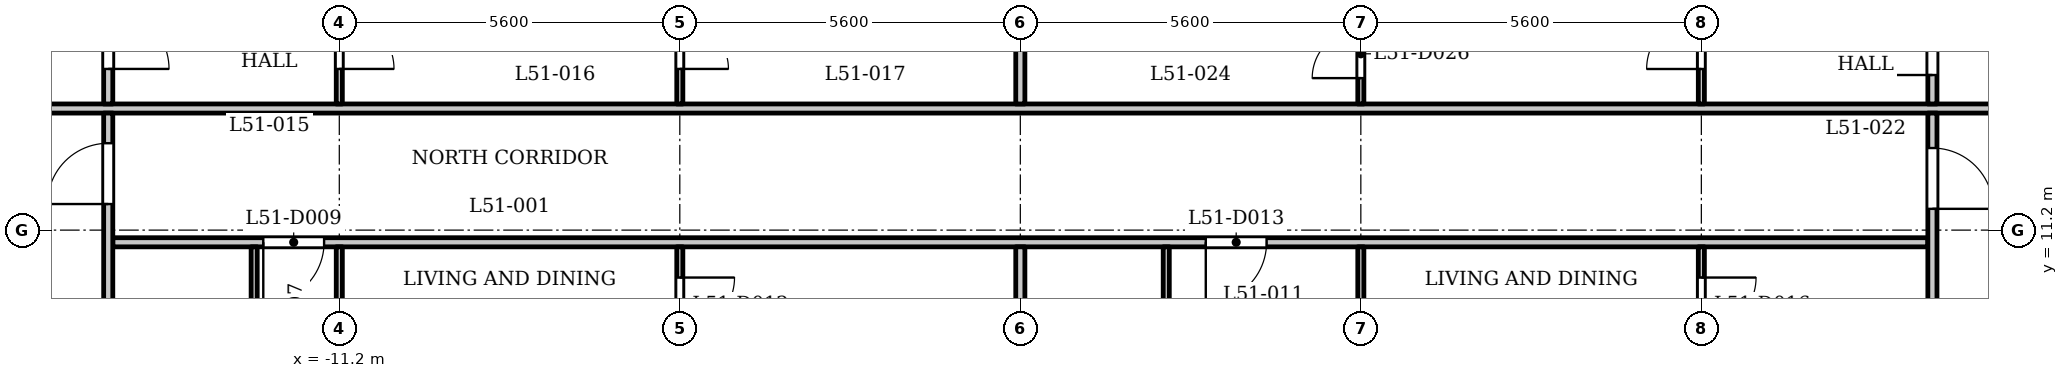
"""IFC4 building model, lengths in metres.
Left out: names, types, materials, properties, quantities, classifications, styles, units other than length and angle.
Written with IfcOpenShell. Run it as: python <this file> out.ifc"""

import sys

from ifc_helpers import new_model, si_unit, direction, frame, frame_2d, origin, place, context, subcontext, project, spatial, rectangle, extrude, element, fill, save


model = new_model("IFC4")
c1 = context("Model", 3, precision=1e-05, world=origin(), true_north=direction((0.0, 1.0)))
c2 = subcontext(c1, "Body", "Model", "MODEL_VIEW")
j1 = project(units=[si_unit("LENGTHUNIT", "METRE"), si_unit("PLANEANGLEUNIT", "RADIAN")], contexts=[c1])
p1 = place(None, origin())
s1 = spatial("IfcSite", under=j1, at=p1, CompositionType="ELEMENT")
p2 = place(p1, origin())
s2 = spatial("IfcBuilding", under=s1, at=p2, CompositionType="ELEMENT")
p3 = place(p2, frame((0.0, 0.0, 199.4)))
s3 = spatial("IfcBuildingStorey", under=s2, at=p3, CompositionType="ELEMENT", Elevation=199.4)
p4 = place(p3, frame((-14.925, 11.0, 0.0), z_axis=(0.0, 0.0, 1.0), x_axis=(1.0, 0.0, 0.0)))
e1 = element("IfcWall", 1, at=p4, inside=s3, PredefinedType="PARTITIONING", context=c2, shape_type="SweptSolid", body=[
    extrude(rectangle(XDim=29.85, YDim=0.15, at=frame_2d((14.925, 0.0))), origin(), (0.0, 0.0, 1.0), 3.2),
])
p5 = place(p4, frame((2.475, 0.0, 0.0)))
e2 = element("IfcOpeningElement", 2, at=p5, cuts=e1, PredefinedType="OPENING", context=c2, shape_type="SweptSolid", body=[
    extrude(rectangle(XDim=1.0, YDim=2.1, at=frame_2d((0.5, 1.05))), frame((0.0, 0.085, 0.0), z_axis=(0.0, -1.0, 0.0), x_axis=(1.0, 0.0, 0.0)), (0.0, 0.0, 1.0), 0.17),
])
p6 = place(p4, frame((17.975, 0.0, 0.0)))
e3 = element("IfcOpeningElement", 3, at=p6, cuts=e1, PredefinedType="OPENING", context=c2, shape_type="SweptSolid", body=[
    extrude(rectangle(XDim=1.0, YDim=2.1, at=frame_2d((0.5, 1.05))), frame((0.0, 0.085, 0.0), z_axis=(0.0, -1.0, 0.0), x_axis=(1.0, 0.0, 0.0)), (0.0, 0.0, 1.0), 0.17),
])
p7 = place(p3, frame((-17.4, 13.2, 0.0), z_axis=(0.0, 0.0, 1.0), x_axis=(1.0, 0.0, 0.0)))
e4 = element("IfcWall", 4, at=p7, inside=s3, PredefinedType="PARTITIONING", context=c2, shape_type="SweptSolid", body=[
    extrude(rectangle(XDim=34.8, YDim=0.15, at=frame_2d((17.4, 0.0))), origin(), (0.0, 0.0, 1.0), 3.2),
])
p8 = place(p7, frame((0.25, 0.0, 0.0)))
e5 = element("IfcOpeningElement", 5, at=p8, cuts=e4, PredefinedType="OPENING", context=c2, shape_type="SweptSolid", body=[
    extrude(rectangle(XDim=1.0, YDim=2.1, at=frame_2d((0.5, 1.05))), frame((0.0, 0.085, 0.0), z_axis=(0.0, -1.0, 0.0), x_axis=(1.0, 0.0, 0.0)), (0.0, 0.0, 1.0), 0.17),
])
p9 = place(p7, frame((33.65, 0.0, 0.0)))
e6 = element("IfcOpeningElement", 6, at=p9, cuts=e4, PredefinedType="OPENING", context=c2, shape_type="SweptSolid", body=[
    extrude(rectangle(XDim=1.0, YDim=2.1, at=frame_2d((0.5, 1.05))), frame((0.0, 0.085, 0.0), z_axis=(0.0, -1.0, 0.0), x_axis=(1.0, 0.0, 0.0)), (0.0, 0.0, 1.0), 0.17),
])
p10 = place(p3, frame((-15.0, 6.769, 0.0), z_axis=(0.0, 0.0, 1.0), x_axis=(0.0, 1.0, 0.0)))
e7 = element("IfcWall", 7, at=p10, inside=s3, PredefinedType="PARTITIONING", context=c2, shape_type="SweptSolid", body=[
    extrude(rectangle(XDim=6.356, YDim=0.15, at=frame_2d((3.178, 0.0))), origin(), (0.0, 0.0, 1.0), 3.2),
])
p11 = place(p10, frame((4.86, 0.0, 0.0)))
e8 = element("IfcOpeningElement", 8, at=p11, cuts=e7, PredefinedType="OPENING", context=c2, shape_type="SweptSolid", body=[
    extrude(rectangle(XDim=1.0, YDim=2.1, at=frame_2d((0.5, 1.05))), frame((0.0, 0.085, 0.0), z_axis=(0.0, -1.0, 0.0), x_axis=(1.0, 0.0, 0.0)), (0.0, 0.0, 1.0), 0.17),
])
p12 = place(p3, frame((-15.0, 13.275, 0.0), z_axis=(0.0, 0.0, 1.0), x_axis=(0.0, 1.0, 0.0)))
e9 = element("IfcWall", 9, at=p12, inside=s3, PredefinedType="PARTITIONING", context=c2, shape_type="SweptSolid", body=[
    extrude(rectangle(XDim=2.05, YDim=0.15, at=frame_2d((1.025, 0.0))), origin(), (0.0, 0.0, 1.0), 3.2),
])
p13 = place(p12, frame((0.576, 0.0, 0.0)))
e10 = element("IfcOpeningElement", 10, at=p13, cuts=e9, PredefinedType="OPENING", context=c2, shape_type="SweptSolid", body=[
    extrude(rectangle(XDim=1.0, YDim=2.1, at=frame_2d((0.5, 1.05))), frame((0.0, 0.085, 0.0), z_axis=(0.0, -1.0, 0.0), x_axis=(1.0, 0.0, 0.0)), (0.0, 0.0, 1.0), 0.17),
])
p14 = place(p3, frame((-12.6, 7.32, 0.0), z_axis=(0.0, 0.0, 1.0), x_axis=(0.0, 1.0, 0.0)))
e11 = element("IfcWall", 11, at=p14, inside=s3, PredefinedType="PARTITIONING", context=c2, shape_type="SweptSolid", body=[
    extrude(rectangle(XDim=3.605, YDim=0.1, at=frame_2d((1.802, 0.0))), origin(), (0.0, 0.0, 1.0), 3.2),
])
p15 = place(p14, frame((1.729, 0.0, 0.0)))
e12 = element("IfcOpeningElement", 12, at=p15, cuts=e11, PredefinedType="OPENING", context=c2, shape_type="SweptSolid", body=[
    extrude(rectangle(XDim=0.8, YDim=2.1, at=frame_2d((0.4, 1.05))), frame((0.0, 0.06, 0.0), z_axis=(0.0, -1.0, 0.0), x_axis=(1.0, 0.0, 0.0)), (0.0, 0.0, 1.0), 0.12),
])
p16 = place(p3, frame((-11.2, 7.32, 0.0), z_axis=(0.0, 0.0, 1.0), x_axis=(0.0, 1.0, 0.0)))
e13 = element("IfcWall", 13, at=p16, inside=s3, PredefinedType="PARTITIONING", context=c2, shape_type="SweptSolid", body=[
    extrude(rectangle(XDim=3.605, YDim=0.1, at=frame_2d((1.802, 0.0))), origin(), (0.0, 0.0, 1.0), 3.2),
])
p17 = place(p16, frame((1.7, 0.0, 0.0)))
e14 = element("IfcOpeningElement", 14, at=p17, cuts=e13, PredefinedType="OPENING", context=c2, shape_type="SweptSolid", body=[
    extrude(rectangle(XDim=0.9, YDim=2.1, at=frame_2d((0.45, 1.05))), frame((0.0, 0.06, 0.0), z_axis=(0.0, -1.0, 0.0), x_axis=(1.0, 0.0, 0.0)), (0.0, 0.0, 1.0), 0.12),
])
p18 = place(p3, frame((-11.2, 13.275, 0.0), z_axis=(0.0, 0.0, 1.0), x_axis=(0.0, 1.0, 0.0)))
e15 = element("IfcWall", 15, at=p18, inside=s3, PredefinedType="PARTITIONING", context=c2, shape_type="SweptSolid", body=[
    extrude(rectangle(XDim=2.575, YDim=0.1, at=frame_2d((1.288, 0.0))), origin(), (0.0, 0.0, 1.0), 3.2),
])
p19 = place(p18, frame((0.576, 0.0, 0.0)))
e16 = element("IfcOpeningElement", 16, at=p19, cuts=e15, PredefinedType="OPENING", context=c2, shape_type="SweptSolid", body=[
    extrude(rectangle(XDim=0.9, YDim=2.1, at=frame_2d((0.45, 1.05))), frame((0.0, 0.06, 0.0), z_axis=(0.0, -1.0, 0.0), x_axis=(1.0, 0.0, 0.0)), (0.0, 0.0, 1.0), 0.12),
])
p20 = place(p3, frame((-5.6, 7.32, 0.0), z_axis=(0.0, 0.0, 1.0), x_axis=(0.0, 1.0, 0.0)))
e17 = element("IfcWall", 17, at=p20, inside=s3, PredefinedType="PARTITIONING", context=c2, shape_type="SweptSolid", body=[
    extrude(rectangle(XDim=3.605, YDim=0.1, at=frame_2d((1.802, 0.0))), origin(), (0.0, 0.0, 1.0), 3.2),
])
p21 = place(p20, frame((2.2, 0.0, 0.0)))
e18 = element("IfcOpeningElement", 18, at=p21, cuts=e17, PredefinedType="OPENING", context=c2, shape_type="SweptSolid", body=[
    extrude(rectangle(XDim=0.9, YDim=2.1, at=frame_2d((0.45, 1.05))), frame((0.0, 0.06, 0.0), z_axis=(0.0, -1.0, 0.0), x_axis=(1.0, 0.0, 0.0)), (0.0, 0.0, 1.0), 0.12),
])
p22 = place(p3, frame((-5.6, 13.275, 0.0), z_axis=(0.0, 0.0, 1.0), x_axis=(0.0, 1.0, 0.0)))
e19 = element("IfcWall", 19, at=p22, inside=s3, PredefinedType="PARTITIONING", context=c2, shape_type="SweptSolid", body=[
    extrude(rectangle(XDim=2.575, YDim=0.1, at=frame_2d((1.288, 0.0))), origin(), (0.0, 0.0, 1.0), 3.2),
])
p23 = place(p22, frame((0.576, 0.0, 0.0)))
e20 = element("IfcOpeningElement", 20, at=p23, cuts=e19, PredefinedType="OPENING", context=c2, shape_type="SweptSolid", body=[
    extrude(rectangle(XDim=0.8, YDim=2.1, at=frame_2d((0.4, 1.05))), frame((0.0, 0.06, 0.0), z_axis=(0.0, -1.0, 0.0), x_axis=(1.0, 0.0, 0.0)), (0.0, 0.0, 1.0), 0.12),
])
p24 = place(p3, frame((0.0, 7.32, 0.0), z_axis=(0.0, 0.0, 1.0), x_axis=(0.0, 1.0, 0.0)))
e21 = element("IfcWall", 21, at=p24, inside=s3, PredefinedType="PARTITIONING", context=c2, shape_type="SweptSolid", body=[
    extrude(rectangle(XDim=3.605, YDim=0.15, at=frame_2d((1.802, 0.0))), origin(), (0.0, 0.0, 1.0), 3.2),
])
p25 = place(p3, frame((0.0, 13.275, 0.0), z_axis=(0.0, 0.0, 1.0), x_axis=(0.0, 1.0, 0.0)))
e22 = element("IfcWall", 22, at=p25, inside=s3, PredefinedType="PARTITIONING", context=c2, shape_type="SweptSolid", body=[
    extrude(rectangle(XDim=2.575, YDim=0.15, at=frame_2d((1.288, 0.0))), origin(), (0.0, 0.0, 1.0), 3.2),
])
p26 = place(p3, frame((2.4, 7.32, 0.0), z_axis=(0.0, 0.0, 1.0), x_axis=(0.0, 1.0, 0.0)))
e23 = element("IfcWall", 23, at=p26, inside=s3, PredefinedType="PARTITIONING", context=c2, shape_type="SweptSolid", body=[
    extrude(rectangle(XDim=3.605, YDim=0.1, at=frame_2d((1.802, 0.0))), origin(), (0.0, 0.0, 1.0), 3.2),
])
p27 = place(p26, frame((0.479, 0.0, 0.0)))
e24 = element("IfcOpeningElement", 24, at=p27, cuts=e23, PredefinedType="OPENING", context=c2, shape_type="SweptSolid", body=[
    extrude(rectangle(XDim=0.8, YDim=2.1, at=frame_2d((0.4, 1.05))), frame((0.0, 0.06, 0.0), z_axis=(0.0, -1.0, 0.0), x_axis=(1.0, 0.0, 0.0)), (0.0, 0.0, 1.0), 0.12),
])
p28 = place(p3, frame((5.6, 7.32, 0.0), z_axis=(0.0, 0.0, 1.0), x_axis=(0.0, 1.0, 0.0)))
e25 = element("IfcWall", 25, at=p28, inside=s3, PredefinedType="PARTITIONING", context=c2, shape_type="SweptSolid", body=[
    extrude(rectangle(XDim=3.605, YDim=0.1, at=frame_2d((1.802, 0.0))), origin(), (0.0, 0.0, 1.0), 3.2),
])
p29 = place(p28, frame((1.7, 0.0, 0.0)))
e26 = element("IfcOpeningElement", 26, at=p29, cuts=e25, PredefinedType="OPENING", context=c2, shape_type="SweptSolid", body=[
    extrude(rectangle(XDim=0.9, YDim=2.1, at=frame_2d((0.45, 1.05))), frame((0.0, 0.06, 0.0), z_axis=(0.0, -1.0, 0.0), x_axis=(1.0, 0.0, 0.0)), (0.0, 0.0, 1.0), 0.12),
])
p30 = place(p3, frame((5.6, 13.275, 0.0), z_axis=(0.0, 0.0, 1.0), x_axis=(0.0, 1.0, 0.0)))
e27 = element("IfcWall", 27, at=p30, inside=s3, PredefinedType="PARTITIONING", context=c2, shape_type="SweptSolid", body=[
    extrude(rectangle(XDim=2.575, YDim=0.1, at=frame_2d((1.288, 0.0))), origin(), (0.0, 0.0, 1.0), 3.2),
])
p31 = place(p30, frame((0.425, 0.0, 0.0)))
e28 = element("IfcOpeningElement", 28, at=p31, cuts=e27, PredefinedType="OPENING", context=c2, shape_type="SweptSolid", body=[
    extrude(rectangle(XDim=0.8, YDim=2.1, at=frame_2d((0.4, 1.05))), frame((0.0, 0.06, 0.0), z_axis=(0.0, -1.0, 0.0), x_axis=(1.0, 0.0, 0.0)), (0.0, 0.0, 1.0), 0.12),
])
p32 = place(p3, frame((11.2, 7.32, 0.0), z_axis=(0.0, 0.0, 1.0), x_axis=(0.0, 1.0, 0.0)))
e29 = element("IfcWall", 29, at=p32, inside=s3, PredefinedType="PARTITIONING", context=c2, shape_type="SweptSolid", body=[
    extrude(rectangle(XDim=3.605, YDim=0.1, at=frame_2d((1.802, 0.0))), origin(), (0.0, 0.0, 1.0), 3.2),
])
p33 = place(p32, frame((2.2, 0.0, 0.0)))
e30 = element("IfcOpeningElement", 30, at=p33, cuts=e29, PredefinedType="OPENING", context=c2, shape_type="SweptSolid", body=[
    extrude(rectangle(XDim=0.9, YDim=2.1, at=frame_2d((0.45, 1.05))), frame((0.0, 0.06, 0.0), z_axis=(0.0, -1.0, 0.0), x_axis=(1.0, 0.0, 0.0)), (0.0, 0.0, 1.0), 0.12),
])
p34 = place(p3, frame((11.2, 13.275, 0.0), z_axis=(0.0, 0.0, 1.0), x_axis=(0.0, 1.0, 0.0)))
e31 = element("IfcWall", 31, at=p34, inside=s3, PredefinedType="PARTITIONING", context=c2, shape_type="SweptSolid", body=[
    extrude(rectangle(XDim=2.575, YDim=0.1, at=frame_2d((1.288, 0.0))), origin(), (0.0, 0.0, 1.0), 3.2),
])
p35 = place(p34, frame((0.575, 0.0, 0.0)))
e32 = element("IfcOpeningElement", 32, at=p35, cuts=e31, PredefinedType="OPENING", context=c2, shape_type="SweptSolid", body=[
    extrude(rectangle(XDim=0.9, YDim=2.1, at=frame_2d((0.45, 1.05))), frame((0.0, 0.06, 0.0), z_axis=(0.0, -1.0, 0.0), x_axis=(1.0, 0.0, 0.0)), (0.0, 0.0, 1.0), 0.12),
])
p36 = place(p3, frame((15.0, 6.769, 0.0), z_axis=(0.0, 0.0, 1.0), x_axis=(0.0, 1.0, 0.0)))
e33 = element("IfcWall", 33, at=p36, inside=s3, PredefinedType="PARTITIONING", context=c2, shape_type="SweptSolid", body=[
    extrude(rectangle(XDim=6.356, YDim=0.15, at=frame_2d((3.178, 0.0))), origin(), (0.0, 0.0, 1.0), 3.2),
])
p37 = place(p36, frame((4.781, 0.0, 0.0)))
e34 = element("IfcOpeningElement", 34, at=p37, cuts=e33, PredefinedType="OPENING", context=c2, shape_type="SweptSolid", body=[
    extrude(rectangle(XDim=1.0, YDim=2.1, at=frame_2d((0.5, 1.05))), frame((0.0, 0.085, 0.0), z_axis=(0.0, -1.0, 0.0), x_axis=(1.0, 0.0, 0.0)), (0.0, 0.0, 1.0), 0.17),
])
p38 = place(p3, frame((15.0, 13.275, 0.0), z_axis=(0.0, 0.0, 1.0), x_axis=(0.0, 1.0, 0.0)))
e35 = element("IfcWall", 35, at=p38, inside=s3, PredefinedType="PARTITIONING", context=c2, shape_type="SweptSolid", body=[
    extrude(rectangle(XDim=2.05, YDim=0.15, at=frame_2d((1.025, 0.0))), origin(), (0.0, 0.0, 1.0), 3.2),
])
p39 = place(p38, frame((0.476, 0.0, 0.0)))
e36 = element("IfcOpeningElement", 36, at=p39, cuts=e35, PredefinedType="OPENING", context=c2, shape_type="SweptSolid", body=[
    extrude(rectangle(XDim=1.0, YDim=2.1, at=frame_2d((0.5, 1.05))), frame((0.0, 0.085, 0.0), z_axis=(0.0, -1.0, 0.0), x_axis=(1.0, 0.0, 0.0)), (0.0, 0.0, 1.0), 0.17),
])
p40 = place(p11, origin())
e37 = element("IfcDoor", 37, at=p40, inside=s3, OperationType="SINGLE_SWING_RIGHT", PredefinedType="DOOR", context=c2, shape_type="SweptSolid", body=[
    extrude(rectangle(XDim=1.0, YDim=2.1, at=frame_2d((0.5, 1.05))), frame((0.0, 0.025, 0.0), z_axis=(0.0, -1.0, 0.0), x_axis=(1.0, 0.0, 0.0)), (0.0, 0.0, 1.0), 0.05),
])
fill(e8, e37)
p41 = place(p37, origin())
e38 = element("IfcDoor", 38, at=p41, inside=s3, OperationType="SINGLE_SWING_LEFT", PredefinedType="DOOR", context=c2, shape_type="SweptSolid", body=[
    extrude(rectangle(XDim=1.0, YDim=2.1, at=frame_2d((0.5, 1.05))), frame((0.0, 0.025, 0.0), z_axis=(0.0, -1.0, 0.0), x_axis=(1.0, 0.0, 0.0)), (0.0, 0.0, 1.0), 0.05),
])
fill(e34, e38)
p42 = place(p5, origin())
e39 = element("IfcDoor", 39, at=p42, inside=s3, OperationType="SINGLE_SWING_LEFT", PredefinedType="DOOR", context=c2, shape_type="SweptSolid", body=[
    extrude(rectangle(XDim=1.0, YDim=2.1, at=frame_2d((0.5, 1.05))), frame((0.0, 0.025, 0.0), z_axis=(0.0, -1.0, 0.0), x_axis=(1.0, 0.0, 0.0)), (0.0, 0.0, 1.0), 0.05),
])
fill(e2, e39)
p43 = place(p21, origin())
e40 = element("IfcDoor", 40, at=p43, inside=s3, OperationType="SINGLE_SWING_RIGHT", PredefinedType="DOOR", context=c2, shape_type="SweptSolid", body=[
    extrude(rectangle(XDim=0.9, YDim=2.1, at=frame_2d((0.45, 1.05))), frame((0.0, 0.025, 0.0), z_axis=(0.0, -1.0, 0.0), x_axis=(1.0, 0.0, 0.0)), (0.0, 0.0, 1.0), 0.05),
])
fill(e18, e40)
p44 = place(p6, origin())
e41 = element("IfcDoor", 41, at=p44, inside=s3, OperationType="SINGLE_SWING_LEFT", PredefinedType="DOOR", context=c2, shape_type="SweptSolid", body=[
    extrude(rectangle(XDim=1.0, YDim=2.1, at=frame_2d((0.5, 1.05))), frame((0.0, 0.025, 0.0), z_axis=(0.0, -1.0, 0.0), x_axis=(1.0, 0.0, 0.0)), (0.0, 0.0, 1.0), 0.05),
])
fill(e3, e41)
p45 = place(p33, origin())
e42 = element("IfcDoor", 42, at=p45, inside=s3, OperationType="SINGLE_SWING_RIGHT", PredefinedType="DOOR", context=c2, shape_type="SweptSolid", body=[
    extrude(rectangle(XDim=0.9, YDim=2.1, at=frame_2d((0.45, 1.05))), frame((0.0, 0.025, 0.0), z_axis=(0.0, -1.0, 0.0), x_axis=(1.0, 0.0, 0.0)), (0.0, 0.0, 1.0), 0.05),
])
fill(e30, e42)
p46 = place(p13, origin())
e43 = element("IfcDoor", 43, at=p46, inside=s3, OperationType="SINGLE_SWING_LEFT", PredefinedType="DOOR", context=c2, shape_type="SweptSolid", body=[
    extrude(rectangle(XDim=1.0, YDim=2.1, at=frame_2d((0.5, 1.05))), frame((0.0, 0.025, 0.0), z_axis=(0.0, -1.0, 0.0), x_axis=(1.0, 0.0, 0.0)), (0.0, 0.0, 1.0), 0.05),
])
fill(e10, e43)
p47 = place(p19, origin())
e44 = element("IfcDoor", 44, at=p47, inside=s3, OperationType="SINGLE_SWING_LEFT", PredefinedType="DOOR", context=c2, shape_type="SweptSolid", body=[
    extrude(rectangle(XDim=0.9, YDim=2.1, at=frame_2d((0.45, 1.05))), frame((0.0, 0.025, 0.0), z_axis=(0.0, -1.0, 0.0), x_axis=(1.0, 0.0, 0.0)), (0.0, 0.0, 1.0), 0.05),
])
fill(e16, e44)
p48 = place(p23, origin())
e45 = element("IfcDoor", 45, at=p48, inside=s3, OperationType="SINGLE_SWING_LEFT", PredefinedType="DOOR", context=c2, shape_type="SweptSolid", body=[
    extrude(rectangle(XDim=0.8, YDim=2.1, at=frame_2d((0.4, 1.05))), frame((0.0, 0.025, 0.0), z_axis=(0.0, -1.0, 0.0), x_axis=(1.0, 0.0, 0.0)), (0.0, 0.0, 1.0), 0.05),
])
fill(e20, e45)
p49 = place(p39, origin())
e46 = element("IfcDoor", 46, at=p49, inside=s3, OperationType="SINGLE_SWING_RIGHT", PredefinedType="DOOR", context=c2, shape_type="SweptSolid", body=[
    extrude(rectangle(XDim=1.0, YDim=2.1, at=frame_2d((0.5, 1.05))), frame((0.0, 0.025, 0.0), z_axis=(0.0, -1.0, 0.0), x_axis=(1.0, 0.0, 0.0)), (0.0, 0.0, 1.0), 0.05),
])
fill(e36, e46)
p50 = place(p35, origin())
e47 = element("IfcDoor", 47, at=p50, inside=s3, OperationType="SINGLE_SWING_RIGHT", PredefinedType="DOOR", context=c2, shape_type="SweptSolid", body=[
    extrude(rectangle(XDim=0.9, YDim=2.1, at=frame_2d((0.45, 1.05))), frame((0.0, 0.025, 0.0), z_axis=(0.0, -1.0, 0.0), x_axis=(1.0, 0.0, 0.0)), (0.0, 0.0, 1.0), 0.05),
])
fill(e32, e47)
p51 = place(p31, origin())
e48 = element("IfcDoor", 48, at=p51, inside=s3, OperationType="SINGLE_SWING_RIGHT", PredefinedType="DOOR", context=c2, shape_type="SweptSolid", body=[
    extrude(rectangle(XDim=0.8, YDim=2.1, at=frame_2d((0.4, 1.05))), frame((0.0, 0.025, 0.0), z_axis=(0.0, -1.0, 0.0), x_axis=(1.0, 0.0, 0.0)), (0.0, 0.0, 1.0), 0.05),
])
fill(e28, e48)
save(model, sys.argv[1])
